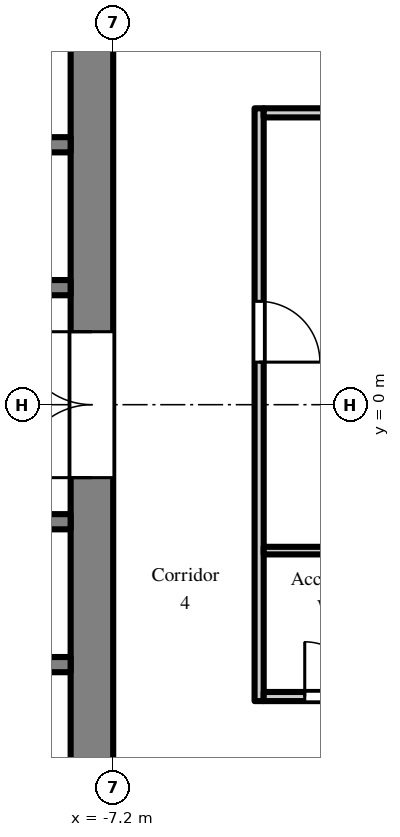
"""IFC4 building model, lengths in metres.
Left out: names, types, materials, properties, quantities, classifications, styles, units other than length and angle.
Written with IfcOpenShell. Run it as: python <this file> out.ifc"""

import sys

from ifc_helpers import new_model, si_unit, direction, frame, frame_2d, origin, place, context, subcontext, project, spatial, rectangle, extrude, element, fill, save


model = new_model("IFC4")
c1 = context("Model", 3, precision=1e-05, world=origin(), true_north=direction((0.0, 1.0)))
c2 = subcontext(c1, "Body", "Model", "MODEL_VIEW")
j1 = project(units=[si_unit("LENGTHUNIT", "METRE"), si_unit("PLANEANGLEUNIT", "RADIAN")], contexts=[c1])
p1 = place(None, origin())
s1 = spatial("IfcSite", under=j1, at=p1, CompositionType="ELEMENT")
p2 = place(p1, origin())
s2 = spatial("IfcBuilding", under=s1, at=p2, CompositionType="ELEMENT")
p3 = place(p2, frame((0.0, 0.0, 159.3)))
s3 = spatial("IfcBuildingStorey", under=s2, at=p3, CompositionType="ELEMENT", Elevation=159.3)
p4 = place(p3, frame((-7.55, -7.2, 0.0), z_axis=(0.0, 0.0, 1.0), x_axis=(0.0, 1.0, 0.0)))
e1 = element("IfcWall", 1, at=p4, inside=s3, PredefinedType="SHEAR", context=c2, shape_type="SweptSolid", body=[
    extrude(rectangle(XDim=14.4, YDim=0.7, at=frame_2d((7.2, 0.0))), origin(), (0.0, 0.0, 1.0), 2.55),
])
p5 = place(p4, frame((6.0, 0.0, 0.0)))
e2 = element("IfcOpeningElement", 2, at=p5, cuts=e1, PredefinedType="OPENING", context=c2, shape_type="SweptSolid", body=[
    extrude(rectangle(XDim=2.4, YDim=2.2, at=frame_2d((1.2, 1.1))), frame((0.0, 0.36, 0.0), z_axis=(0.0, -1.0, 0.0), x_axis=(1.0, 0.0, 0.0)), (0.0, 0.0, 1.0), 0.72),
])
p6 = place(p3, frame((-7.9, 1.925, 0.0), z_axis=(0.0, 0.0, 1.0), x_axis=(-1.0, 0.0, 0.0)))
e3 = element("IfcWall", 3, at=p6, inside=s3, PredefinedType="SHEAR", context=c2, shape_type="SweptSolid", body=[
    extrude(rectangle(XDim=12.95, YDim=0.25, at=frame_2d((6.475, 0.0))), origin(), (0.0, 0.0, 1.0), 2.55),
])
p7 = place(p6, frame((4.825, 0.0, 0.0)))
e4 = element("IfcOpeningElement", 4, at=p7, cuts=e3, PredefinedType="OPENING", context=c2, shape_type="SweptSolid", body=[
    extrude(rectangle(XDim=1.1, YDim=2.1, at=frame_2d((0.55, 1.05))), frame((0.0, 0.135, 0.0), z_axis=(0.0, -1.0, 0.0), x_axis=(1.0, 0.0, 0.0)), (0.0, 0.0, 1.0), 0.27),
])
p8 = place(p6, frame((7.025, 0.0, 0.0)))
e5 = element("IfcOpeningElement", 5, at=p8, cuts=e3, PredefinedType="OPENING", context=c2, shape_type="SweptSolid", body=[
    extrude(rectangle(XDim=1.1, YDim=2.1, at=frame_2d((0.55, 1.05))), frame((0.0, 0.135, 0.0), z_axis=(0.0, -1.0, 0.0), x_axis=(1.0, 0.0, 0.0)), (0.0, 0.0, 1.0), 0.27),
])
p9 = place(p6, frame((9.225, 0.0, 0.0)))
e6 = element("IfcOpeningElement", 6, at=p9, cuts=e3, PredefinedType="OPENING", context=c2, shape_type="SweptSolid", body=[
    extrude(rectangle(XDim=1.1, YDim=2.1, at=frame_2d((0.55, 1.05))), frame((0.0, 0.135, 0.0), z_axis=(0.0, -1.0, 0.0), x_axis=(1.0, 0.0, 0.0)), (0.0, 0.0, 1.0), 0.27),
])
p10 = place(p6, frame((0.525, 0.0, 0.0)))
e7 = element("IfcOpeningElement", 7, at=p10, cuts=e3, PredefinedType="OPENING", context=c2, shape_type="SweptSolid", body=[
    extrude(rectangle(XDim=0.9, YDim=2.1, at=frame_2d((0.45, 1.05))), frame((0.0, 0.135, 0.0), z_axis=(0.0, -1.0, 0.0), x_axis=(1.0, 0.0, 0.0)), (0.0, 0.0, 1.0), 0.27),
])
p11 = place(p6, frame((2.625, 0.0, 0.0)))
e8 = element("IfcOpeningElement", 8, at=p11, cuts=e3, PredefinedType="OPENING", context=c2, shape_type="SweptSolid", body=[
    extrude(rectangle(XDim=1.1, YDim=2.1, at=frame_2d((0.55, 1.05))), frame((0.0, 0.135, 0.0), z_axis=(0.0, -1.0, 0.0), x_axis=(1.0, 0.0, 0.0)), (0.0, 0.0, 1.0), 0.27),
])
p12 = place(p6, frame((11.525, 0.0, 0.0)))
e9 = element("IfcOpeningElement", 9, at=p12, cuts=e3, PredefinedType="OPENING", context=c2, shape_type="SweptSolid", body=[
    extrude(rectangle(XDim=0.9, YDim=2.1, at=frame_2d((0.45, 1.05))), frame((0.0, 0.135, 0.0), z_axis=(0.0, -1.0, 0.0), x_axis=(1.0, 0.0, 0.0)), (0.0, 0.0, 1.0), 0.27),
])
p13 = place(p3, frame((-7.9, 4.275, 0.0), z_axis=(0.0, 0.0, 1.0), x_axis=(-1.0, 0.0, 0.0)))
e10 = element("IfcWall", 10, at=p13, inside=s3, PredefinedType="SHEAR", context=c2, shape_type="SweptSolid", body=[
    extrude(rectangle(XDim=1.95, YDim=0.25, at=frame_2d((0.975, 0.0))), origin(), (0.0, 0.0, 1.0), 2.55),
])
p14 = place(p3, frame((-7.9, -1.925, 0.0), z_axis=(0.0, 0.0, 1.0), x_axis=(-1.0, 0.0, 0.0)))
e11 = element("IfcWall", 11, at=p14, inside=s3, PredefinedType="SHEAR", context=c2, shape_type="SweptSolid", body=[
    extrude(rectangle(XDim=12.95, YDim=0.25, at=frame_2d((6.475, 0.0))), origin(), (0.0, 0.0, 1.0), 2.55),
])
p15 = place(p14, frame((0.525, 0.0, 0.0)))
e12 = element("IfcOpeningElement", 12, at=p15, cuts=e11, PredefinedType="OPENING", context=c2, shape_type="SweptSolid", body=[
    extrude(rectangle(XDim=0.9, YDim=2.1, at=frame_2d((0.45, 1.05))), frame((0.0, 0.135, 0.0), z_axis=(0.0, -1.0, 0.0), x_axis=(1.0, 0.0, 0.0)), (0.0, 0.0, 1.0), 0.27),
])
p16 = place(p14, frame((2.625, 0.0, 0.0)))
e13 = element("IfcOpeningElement", 13, at=p16, cuts=e11, PredefinedType="OPENING", context=c2, shape_type="SweptSolid", body=[
    extrude(rectangle(XDim=1.1, YDim=2.1, at=frame_2d((0.55, 1.05))), frame((0.0, 0.135, 0.0), z_axis=(0.0, -1.0, 0.0), x_axis=(1.0, 0.0, 0.0)), (0.0, 0.0, 1.0), 0.27),
])
p17 = place(p14, frame((8.225, 0.0, 0.0)))
e14 = element("IfcOpeningElement", 14, at=p17, cuts=e11, PredefinedType="OPENING", context=c2, shape_type="SweptSolid", body=[
    extrude(rectangle(XDim=0.9, YDim=2.1, at=frame_2d((0.45, 1.05))), frame((0.0, 0.135, 0.0), z_axis=(0.0, -1.0, 0.0), x_axis=(1.0, 0.0, 0.0)), (0.0, 0.0, 1.0), 0.27),
])
p18 = place(p3, frame((-7.9, -4.275, 0.0), z_axis=(0.0, 0.0, 1.0), x_axis=(-1.0, 0.0, 0.0)))
e15 = element("IfcWall", 15, at=p18, inside=s3, PredefinedType="SHEAR", context=c2, shape_type="SweptSolid", body=[
    extrude(rectangle(XDim=1.95, YDim=0.25, at=frame_2d((0.975, 0.0))), origin(), (0.0, 0.0, 1.0), 2.55),
])
p19 = place(p3, frame((-4.8, -4.875, 0.0), z_axis=(0.0, 0.0, 1.0), x_axis=(0.0, 1.0, 0.0)))
e16 = element("IfcWall", 16, at=p19, inside=s3, PredefinedType="PARTITIONING", context=c2, shape_type="SweptSolid", body=[
    extrude(rectangle(XDim=9.75, YDim=0.15, at=frame_2d((4.875, 0.0))), origin(), (0.0, 0.0, 1.0), 2.55),
])
p20 = place(p19, frame((5.575, 0.0, 0.0)))
e17 = element("IfcOpeningElement", 17, at=p20, cuts=e16, PredefinedType="OPENING", context=c2, shape_type="SweptSolid", body=[
    extrude(rectangle(XDim=1.0, YDim=2.1, at=frame_2d((0.5, 1.05))), frame((0.0, 0.085, 0.0), z_axis=(0.0, -1.0, 0.0), x_axis=(1.0, 0.0, 0.0)), (0.0, 0.0, 1.0), 0.17),
])
p21 = place(p3, frame((-4.725, -4.8, 0.0), z_axis=(0.0, 0.0, 1.0), x_axis=(1.0, 0.0, 0.0)))
e18 = element("IfcWall", 18, at=p21, inside=s3, PredefinedType="PARTITIONING", context=c2, shape_type="SweptSolid", body=[
    extrude(rectangle(XDim=9.6, YDim=0.15, at=frame_2d((4.8, 0.0))), origin(), (0.0, 0.0, 1.0), 2.55),
])
p22 = place(p21, frame((0.675, 0.0, 0.0)))
e19 = element("IfcOpeningElement", 19, at=p22, cuts=e18, PredefinedType="OPENING", context=c2, shape_type="SweptSolid", body=[
    extrude(rectangle(XDim=0.9, YDim=2.1, at=frame_2d((0.45, 1.05))), frame((0.0, 0.085, 0.0), z_axis=(0.0, -1.0, 0.0), x_axis=(1.0, 0.0, 0.0)), (0.0, 0.0, 1.0), 0.17),
])
p23 = place(p21, frame((3.075, 0.0, 0.0)))
e20 = element("IfcOpeningElement", 20, at=p23, cuts=e18, PredefinedType="OPENING", context=c2, shape_type="SweptSolid", body=[
    extrude(rectangle(XDim=0.9, YDim=2.1, at=frame_2d((0.45, 1.05))), frame((0.0, 0.085, 0.0), z_axis=(0.0, -1.0, 0.0), x_axis=(1.0, 0.0, 0.0)), (0.0, 0.0, 1.0), 0.17),
])
p24 = place(p21, frame((6.675, 0.0, 0.0)))
e21 = element("IfcOpeningElement", 21, at=p24, cuts=e18, PredefinedType="OPENING", context=c2, shape_type="SweptSolid", body=[
    extrude(rectangle(XDim=0.9, YDim=2.1, at=frame_2d((0.45, 1.05))), frame((0.0, 0.085, 0.0), z_axis=(0.0, -1.0, 0.0), x_axis=(1.0, 0.0, 0.0)), (0.0, 0.0, 1.0), 0.17),
])
p25 = place(p3, frame((-4.725, -2.4, 0.0), z_axis=(0.0, 0.0, 1.0), x_axis=(1.0, 0.0, 0.0)))
e22 = element("IfcWall", 22, at=p25, inside=s3, PredefinedType="PARTITIONING", context=c2, shape_type="SweptSolid", body=[
    extrude(rectangle(XDim=4.725, YDim=0.125, at=frame_2d((2.363, 0.0))), origin(), (0.0, 0.0, 1.0), 2.55),
])
p26 = place(p3, frame((-4.725, 4.8, 0.0), z_axis=(0.0, 0.0, 1.0), x_axis=(1.0, 0.0, 0.0)))
e23 = element("IfcWall", 23, at=p26, inside=s3, PredefinedType="PARTITIONING", context=c2, shape_type="SweptSolid", body=[
    extrude(rectangle(XDim=9.6, YDim=0.15, at=frame_2d((4.8, 0.0))), origin(), (0.0, 0.0, 1.0), 2.55),
])
p27 = place(p5, origin())
e24 = element("IfcDoor", 24, at=p27, inside=s3, OperationType="DOUBLE_DOOR_DOUBLE_SWING", PredefinedType="DOOR", context=c2, shape_type="SweptSolid", body=[
    extrude(rectangle(XDim=2.4, YDim=2.2, at=frame_2d((1.2, 1.1))), frame((0.0, 0.025, 0.0), z_axis=(0.0, -1.0, 0.0), x_axis=(1.0, 0.0, 0.0)), (0.0, 0.0, 1.0), 0.05),
])
fill(e2, e24)
p28 = place(p22, origin())
e25 = element("IfcDoor", 25, at=p28, inside=s3, OperationType="SINGLE_SWING_LEFT", PredefinedType="DOOR", context=c2, shape_type="SweptSolid", body=[
    extrude(rectangle(XDim=0.9, YDim=2.1, at=frame_2d((0.45, 1.05))), frame((0.0, 0.025, 0.0), z_axis=(0.0, -1.0, 0.0), x_axis=(1.0, 0.0, 0.0)), (0.0, 0.0, 1.0), 0.05),
])
fill(e19, e25)
p29 = place(p20, frame((1.0, 0.0, 0.0), z_axis=(0.0, 0.0, 1.0), x_axis=(-1.0, 0.0, 0.0)))
e26 = element("IfcDoor", 26, at=p29, inside=s3, OperationType="SINGLE_SWING_RIGHT", PredefinedType="DOOR", context=c2, shape_type="SweptSolid", body=[
    extrude(rectangle(XDim=1.0, YDim=2.1, at=frame_2d((0.5, 1.05))), frame((0.0, 0.025, 0.0), z_axis=(0.0, -1.0, 0.0), x_axis=(1.0, 0.0, 0.0)), (0.0, 0.0, 1.0), 0.05),
])
fill(e17, e26)
save(model, sys.argv[1])
